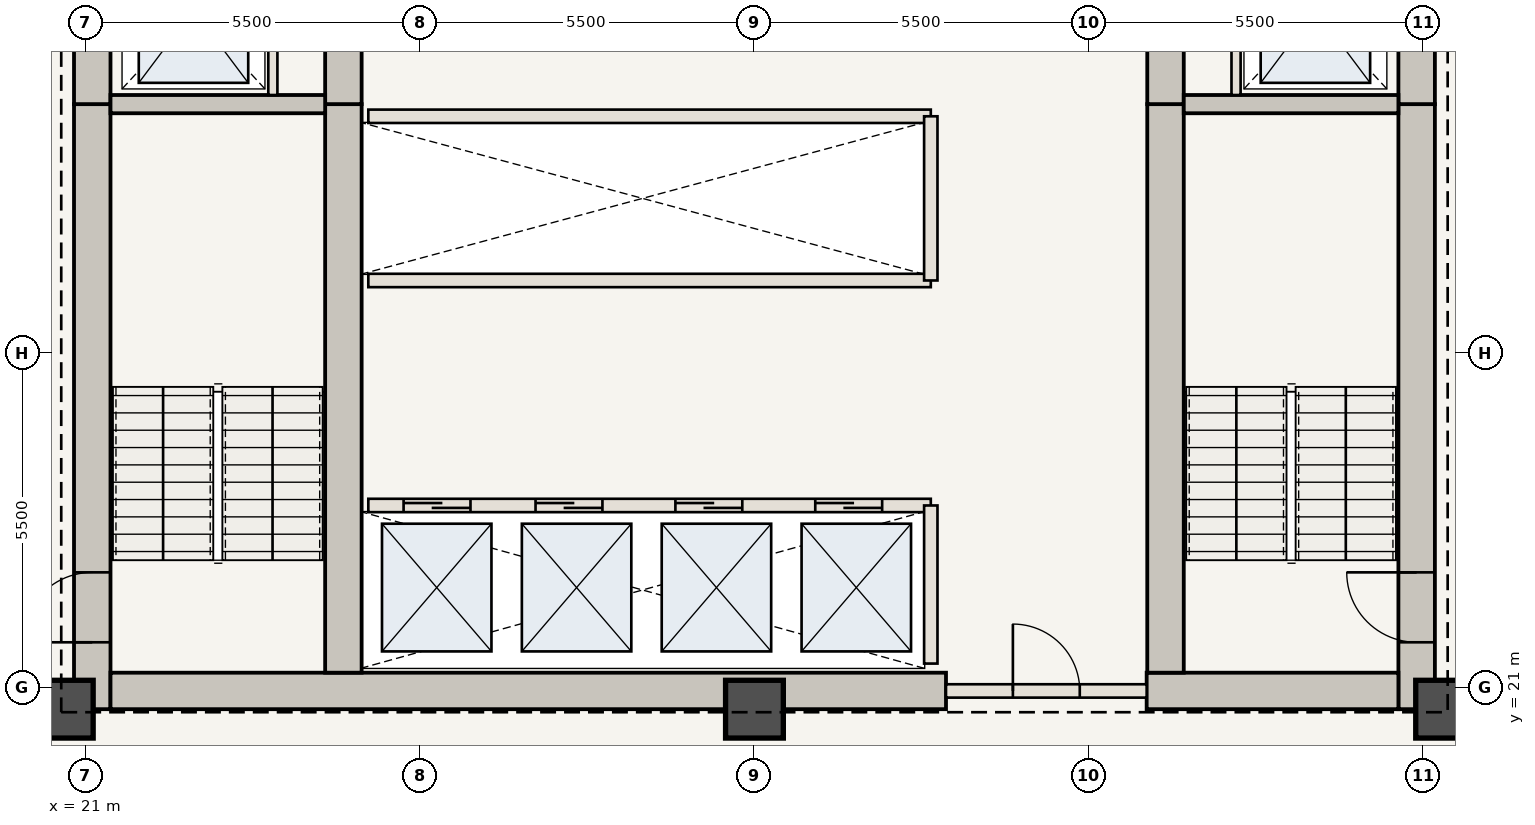
"""IFC4 building model, lengths in metres.
Left out: names, types, materials, properties, quantities, classifications, styles, units other than length and angle.
Written with IfcOpenShell. Run it as: python <this file> out.ifc"""

import sys

from ifc_helpers import new_model, si_unit, direction, frame, frame_2d, origin, origin_2d, place, context, subcontext, project, spatial, rectangle, extrude, element, fill, save


model = new_model("IFC4")
c1 = context("Model", 3, precision=1e-05, world=origin(), true_north=direction((0.0, 1.0)))
c2 = subcontext(c1, "Body", "Model", "MODEL_VIEW")
j1 = project(units=[si_unit("LENGTHUNIT", "METRE"), si_unit("PLANEANGLEUNIT", "RADIAN")], contexts=[c1])
p1 = place(None, origin())
s1 = spatial("IfcSite", under=j1, at=p1, CompositionType="ELEMENT")
p2 = place(p1, origin())
s2 = spatial("IfcBuilding", under=s1, at=p2, CompositionType="ELEMENT")
p3 = place(p2, frame((0.0, 0.0, 122.15)))
s3 = spatial("IfcBuildingStorey", under=s2, at=p3, CompositionType="ELEMENT", Elevation=122.15)
p4 = place(p3, frame((21.11, 20.65, 0.0), z_axis=(0.0, 0.0, 1.0), x_axis=(0.0, 1.0, 0.0)))
e1 = element("IfcWall", 1, at=p4, inside=s3, PredefinedType="SHEAR", context=c2, shape_type="SweptSolid", body=[
    extrude(rectangle(XDim=9.95, YDim=0.6, at=frame_2d((4.975, 0.0))), origin(), (0.0, 0.0, 1.0), 3.85),
])
p5 = place(p4, frame((1.1, 0.0, 0.0)))
e2 = element("IfcOpeningElement", 2, at=p5, cuts=e1, PredefinedType="OPENING", context=c2, shape_type="SweptSolid", body=[
    extrude(rectangle(XDim=1.15, YDim=2.15, at=frame_2d((0.575, 1.075))), frame((0.0, 0.31, 0.0), z_axis=(0.0, -1.0, 0.0), x_axis=(1.0, 0.0, 0.0)), (0.0, 0.0, 1.0), 0.62),
])
p6 = place(p3, frame((21.11, 30.6, 0.0), z_axis=(0.0, 0.0, 1.0), x_axis=(0.0, 1.0, 0.0)))
e3 = element("IfcWall", 3, at=p6, inside=s3, PredefinedType="SHEAR", context=c2, shape_type="SweptSolid", body=[
    extrude(rectangle(XDim=12.7, YDim=0.6, at=frame_2d((6.35, 0.0))), origin(), (0.0, 0.0, 1.0), 3.85),
])
p7 = place(p6, frame((4.2, 0.0, 0.0)))
e4 = element("IfcOpeningElement", 4, at=p7, cuts=e3, PredefinedType="OPENING", context=c2, shape_type="SweptSolid", body=[
    extrude(rectangle(XDim=1.1, YDim=2.15, at=frame_2d((0.55, 1.075))), frame((0.0, 0.31, 0.0), z_axis=(0.0, -1.0, 0.0), x_axis=(1.0, 0.0, 0.0)), (0.0, 0.0, 1.0), 0.62),
])
p8 = place(p6, frame((8.05, 0.0, 0.0)))
e5 = element("IfcOpeningElement", 5, at=p8, cuts=e3, PredefinedType="OPENING", context=c2, shape_type="SweptSolid", body=[
    extrude(rectangle(XDim=0.92, YDim=2.1, at=frame_2d((0.46, 1.05))), frame((0.0, 0.31, 0.0), z_axis=(0.0, -1.0, 0.0), x_axis=(1.0, 0.0, 0.0)), (0.0, 0.0, 1.0), 0.62),
])
p9 = place(p6, frame((9.45, 0.0, 0.0)))
e6 = element("IfcOpeningElement", 6, at=p9, cuts=e3, PredefinedType="OPENING", context=c2, shape_type="SweptSolid", body=[
    extrude(rectangle(XDim=0.88, YDim=2.1, at=frame_2d((0.44, 1.05))), frame((0.0, 0.31, 0.0), z_axis=(0.0, -1.0, 0.0), x_axis=(1.0, 0.0, 0.0)), (0.0, 0.0, 1.0), 0.62),
])
p10 = place(p6, frame((10.85, 0.0, 0.0)))
e7 = element("IfcOpeningElement", 7, at=p10, cuts=e3, PredefinedType="OPENING", context=c2, shape_type="SweptSolid", body=[
    extrude(rectangle(XDim=0.88, YDim=2.1, at=frame_2d((0.44, 1.05))), frame((0.0, 0.31, 0.0), z_axis=(0.0, -1.0, 0.0), x_axis=(1.0, 0.0, 0.0)), (0.0, 0.0, 1.0), 0.62),
])
p11 = place(p3, frame((42.89, 20.65, 0.0), z_axis=(0.0, 0.0, 1.0), x_axis=(0.0, 1.0, 0.0)))
e8 = element("IfcWall", 8, at=p11, inside=s3, PredefinedType="SHEAR", context=c2, shape_type="SweptSolid", body=[
    extrude(rectangle(XDim=9.95, YDim=0.6, at=frame_2d((4.975, 0.0))), origin(), (0.0, 0.0, 1.0), 3.85),
])
p12 = place(p11, frame((1.1, 0.0, 0.0)))
e9 = element("IfcOpeningElement", 9, at=p12, cuts=e8, PredefinedType="OPENING", context=c2, shape_type="SweptSolid", body=[
    extrude(rectangle(XDim=1.15, YDim=2.15, at=frame_2d((0.575, 1.075))), frame((0.0, 0.31, 0.0), z_axis=(0.0, -1.0, 0.0), x_axis=(1.0, 0.0, 0.0)), (0.0, 0.0, 1.0), 0.62),
])
p13 = place(p3, frame((42.89, 30.6, 0.0), z_axis=(0.0, 0.0, 1.0), x_axis=(0.0, 1.0, 0.0)))
e10 = element("IfcWall", 10, at=p13, inside=s3, PredefinedType="SHEAR", context=c2, shape_type="SweptSolid", body=[
    extrude(rectangle(XDim=12.7, YDim=0.6, at=frame_2d((6.35, 0.0))), origin(), (0.0, 0.0, 1.0), 3.85),
])
p14 = place(p13, frame((4.2, 0.0, 0.0)))
e11 = element("IfcOpeningElement", 11, at=p14, cuts=e10, PredefinedType="OPENING", context=c2, shape_type="SweptSolid", body=[
    extrude(rectangle(XDim=1.1, YDim=2.15, at=frame_2d((0.55, 1.075))), frame((0.0, 0.31, 0.0), z_axis=(0.0, -1.0, 0.0), x_axis=(1.0, 0.0, 0.0)), (0.0, 0.0, 1.0), 0.62),
])
p15 = place(p13, frame((9.2, 0.0, 0.0)))
e12 = element("IfcOpeningElement", 12, at=p15, cuts=e10, PredefinedType="OPENING", context=c2, shape_type="SweptSolid", body=[
    extrude(rectangle(XDim=0.92, YDim=2.1, at=frame_2d((0.46, 1.05))), frame((0.0, 0.31, 0.0), z_axis=(0.0, -1.0, 0.0), x_axis=(1.0, 0.0, 0.0)), (0.0, 0.0, 1.0), 0.62),
])
p16 = place(p3, frame((21.41, 20.95, 0.0), z_axis=(0.0, 0.0, 1.0), x_axis=(1.0, 0.0, 0.0)))
e13 = element("IfcWall", 13, at=p16, inside=s3, PredefinedType="SHEAR", context=c2, shape_type="SweptSolid", body=[
    extrude(rectangle(XDim=13.74, YDim=0.6, at=frame_2d((6.87, 0.0))), origin(), (0.0, 0.0, 1.0), 3.85),
])
p17 = place(p3, frame((38.45, 20.95, 0.0), z_axis=(0.0, 0.0, 1.0), x_axis=(1.0, 0.0, 0.0)))
e14 = element("IfcWall", 14, at=p17, inside=s3, PredefinedType="SHEAR", context=c2, shape_type="SweptSolid", body=[
    extrude(rectangle(XDim=4.14, YDim=0.6, at=frame_2d((2.07, 0.0))), origin(), (0.0, 0.0, 1.0), 3.85),
])
p18 = place(p3, frame((25.24, 21.25, 0.0), z_axis=(0.0, 0.0, 1.0), x_axis=(0.0, 1.0, 0.0)))
e15 = element("IfcWall", 15, at=p18, inside=s3, PredefinedType="SHEAR", context=c2, shape_type="SweptSolid", body=[
    extrude(rectangle(XDim=9.35, YDim=0.6, at=frame_2d((4.675, 0.0))), origin(), (0.0, 0.0, 1.0), 3.85),
])
p19 = place(p3, frame((25.24, 30.6, 0.0), z_axis=(0.0, 0.0, 1.0), x_axis=(0.0, 1.0, 0.0)))
e16 = element("IfcWall", 16, at=p19, inside=s3, PredefinedType="SHEAR", context=c2, shape_type="SweptSolid", body=[
    extrude(rectangle(XDim=12.1, YDim=0.6, at=frame_2d((6.05, 0.0))), origin(), (0.0, 0.0, 1.0), 3.85),
])
p20 = place(p19, frame((6.25, 0.0, 0.0)))
e17 = element("IfcOpeningElement", 17, at=p20, cuts=e16, PredefinedType="OPENING", context=c2, shape_type="SweptSolid", body=[
    extrude(rectangle(XDim=1.1, YDim=2.15, at=frame_2d((0.55, 1.075))), frame((0.0, 0.31, 0.0), z_axis=(0.0, -1.0, 0.0), x_axis=(1.0, 0.0, 0.0)), (0.0, 0.0, 1.0), 0.62),
])
p21 = place(p3, frame((38.76, 21.25, 0.0), z_axis=(0.0, 0.0, 1.0), x_axis=(0.0, 1.0, 0.0)))
e18 = element("IfcWall", 18, at=p21, inside=s3, PredefinedType="SHEAR", context=c2, shape_type="SweptSolid", body=[
    extrude(rectangle(XDim=9.35, YDim=0.6, at=frame_2d((4.675, 0.0))), origin(), (0.0, 0.0, 1.0), 3.85),
])
p22 = place(p3, frame((38.76, 30.6, 0.0), z_axis=(0.0, 0.0, 1.0), x_axis=(0.0, 1.0, 0.0)))
e19 = element("IfcWall", 19, at=p22, inside=s3, PredefinedType="SHEAR", context=c2, shape_type="SweptSolid", body=[
    extrude(rectangle(XDim=12.1, YDim=0.6, at=frame_2d((6.05, 0.0))), origin(), (0.0, 0.0, 1.0), 3.85),
])
for number, where, z_axis, x_axis in (
    (20, (20.65, 20.65, 0.0), (0.0, 0.0, 1.0), (1.0, 0.0, 0.0)),
    (21, (32.0, 20.65, 0.0), (0.0, 0.0, 1.0), (1.0, 0.0, 0.0)),
    (22, (43.35, 20.65, 0.0), (0.0, 0.0, 1.0), (1.0, 0.0, 0.0)),
):
    element("IfcColumn", number, at=place(p3, frame(where, z_axis=z_axis, x_axis=x_axis)), inside=s3, PredefinedType="COLUMN", context=c2, shape_type="SweptSolid", body=[
        extrude(rectangle(XDim=0.95, YDim=0.95, at=origin_2d()), origin(), (0.0, 0.0, 1.0), 3.85),
    ])
for number, where, z_axis, x_axis in (
    (23, (21.41, 30.6, 0.0), (0.0, 0.0, 1.0), (1.0, 0.0, 0.0)),
    (24, (39.06, 30.6, 0.0), (0.0, 0.0, 1.0), (1.0, 0.0, 0.0)),
):
    element("IfcWall", number, at=place(p3, frame(where, z_axis=z_axis, x_axis=x_axis)), inside=s3, PredefinedType="SHEAR", context=c2, shape_type="SweptSolid", body=[
        extrude(rectangle(XDim=3.53, YDim=0.3, at=frame_2d((1.765, 0.0))), origin(), (0.0, 0.0, 1.0), 3.685),
    ])
for number, where, z_axis, x_axis in (
    (25, (24.08, 30.75, 0.0), (0.0, 0.0, 1.0), (0.0, 1.0, 0.0)),
    (26, (39.92, 30.75, 0.0), (0.0, 0.0, 1.0), (0.0, 1.0, 0.0)),
):
    element("IfcWall", number, at=place(p3, frame(where, z_axis=z_axis, x_axis=x_axis)), inside=s3, PredefinedType="STANDARD", context=c2, shape_type="SweptSolid", body=[
        extrude(rectangle(XDim=2.65, YDim=0.15, at=frame_2d((1.325, 0.0))), origin(), (0.0, 0.0, 1.0), 3.685),
    ])
p23 = place(p3, frame((35.15, 20.95, 0.0), z_axis=(0.0, 0.0, 1.0), x_axis=(1.0, 0.0, 0.0)))
e27 = element("IfcWall", 27, at=p23, inside=s3, PredefinedType="STANDARD", context=c2, shape_type="SweptSolid", body=[
    extrude(rectangle(XDim=3.3, YDim=0.22, at=frame_2d((1.65, 0.0))), origin(), (0.0, 0.0, 1.0), 3.685),
])
p24 = place(p23, frame((1.1, 0.0, 0.0)))
e28 = element("IfcOpeningElement", 28, at=p24, cuts=e27, PredefinedType="OPENING", context=c2, shape_type="SweptSolid", body=[
    extrude(rectangle(XDim=1.1, YDim=2.15, at=frame_2d((0.55, 1.075))), frame((0.0, 0.12, 0.0), z_axis=(0.0, -1.0, 0.0), x_axis=(1.0, 0.0, 0.0)), (0.0, 0.0, 1.0), 0.24),
])
p25 = place(p3, frame((25.65, 24.0, 0.0), z_axis=(0.0, 0.0, 1.0), x_axis=(1.0, 0.0, 0.0)))
e29 = element("IfcWall", 29, at=p25, inside=s3, PredefinedType="STANDARD", context=c2, shape_type="SweptSolid", body=[
    extrude(rectangle(XDim=9.25, YDim=0.22, at=frame_2d((4.625, 0.0))), origin(), (0.0, 0.0, 1.0), 3.685),
])
p26 = place(p25, frame((0.58, 0.0, 0.0)))
e30 = element("IfcOpeningElement", 30, at=p26, cuts=e29, PredefinedType="OPENING", context=c2, shape_type="SweptSolid", body=[
    extrude(rectangle(XDim=1.1, YDim=2.15, at=frame_2d((0.55, 1.075))), frame((0.0, 0.12, 0.0), z_axis=(0.0, -1.0, 0.0), x_axis=(1.0, 0.0, 0.0)), (0.0, 0.0, 1.0), 0.24),
])
p27 = place(p25, frame((2.75, 0.0, 0.0)))
e31 = element("IfcOpeningElement", 31, at=p27, cuts=e29, PredefinedType="OPENING", context=c2, shape_type="SweptSolid", body=[
    extrude(rectangle(XDim=1.1, YDim=2.15, at=frame_2d((0.55, 1.075))), frame((0.0, 0.12, 0.0), z_axis=(0.0, -1.0, 0.0), x_axis=(1.0, 0.0, 0.0)), (0.0, 0.0, 1.0), 0.24),
])
p28 = place(p25, frame((5.05, 0.0, 0.0)))
e32 = element("IfcOpeningElement", 32, at=p28, cuts=e29, PredefinedType="OPENING", context=c2, shape_type="SweptSolid", body=[
    extrude(rectangle(XDim=1.1, YDim=2.15, at=frame_2d((0.55, 1.075))), frame((0.0, 0.12, 0.0), z_axis=(0.0, -1.0, 0.0), x_axis=(1.0, 0.0, 0.0)), (0.0, 0.0, 1.0), 0.24),
])
p29 = place(p25, frame((7.35, 0.0, 0.0)))
e33 = element("IfcOpeningElement", 33, at=p29, cuts=e29, PredefinedType="OPENING", context=c2, shape_type="SweptSolid", body=[
    extrude(rectangle(XDim=1.1, YDim=2.15, at=frame_2d((0.55, 1.075))), frame((0.0, 0.12, 0.0), z_axis=(0.0, -1.0, 0.0), x_axis=(1.0, 0.0, 0.0)), (0.0, 0.0, 1.0), 0.24),
])
p30 = place(p3, frame((34.9, 21.4, 0.0), z_axis=(0.0, 0.0, 1.0), x_axis=(0.0, 1.0, 0.0)))
e34 = element("IfcWall", 34, at=p30, inside=s3, PredefinedType="STANDARD", context=c2, shape_type="SweptSolid", body=[
    extrude(rectangle(XDim=2.6, YDim=0.22, at=frame_2d((1.3, 0.0))), origin(), (0.0, 0.0, 1.0), 3.685),
])
for number, where, z_axis, x_axis in (
    (35, (25.65, 27.7, 0.0), (0.0, 0.0, 1.0), (1.0, 0.0, 0.0)),
    (36, (25.65, 30.4, 0.0), (0.0, 0.0, 1.0), (1.0, 0.0, 0.0)),
):
    element("IfcWall", number, at=place(p3, frame(where, z_axis=z_axis, x_axis=x_axis)), inside=s3, PredefinedType="STANDARD", context=c2, shape_type="SweptSolid", body=[
        extrude(rectangle(XDim=9.25, YDim=0.22, at=frame_2d((4.625, 0.0))), origin(), (0.0, 0.0, 1.0), 3.685),
    ])
p31 = place(p3, frame((34.9, 27.7, 0.0), z_axis=(0.0, 0.0, 1.0), x_axis=(0.0, 1.0, 0.0)))
e37 = element("IfcWall", 37, at=p31, inside=s3, PredefinedType="STANDARD", context=c2, shape_type="SweptSolid", body=[
    extrude(rectangle(XDim=2.7, YDim=0.22, at=frame_2d((1.35, 0.0))), origin(), (0.0, 0.0, 1.0), 3.685),
])
p32 = place(p5, origin())
e38 = element("IfcDoor", 38, at=p32, inside=s3, OperationType="SINGLE_SWING_LEFT", PredefinedType="DOOR", context=c2, shape_type="SweptSolid", body=[
    extrude(rectangle(XDim=1.15, YDim=2.15, at=frame_2d((0.575, 1.075))), frame((0.0, 0.025, 0.0), z_axis=(0.0, -1.0, 0.0), x_axis=(1.0, 0.0, 0.0)), (0.0, 0.0, 1.0), 0.05),
])
fill(e2, e38)
p33 = place(p12, origin())
e39 = element("IfcDoor", 39, at=p33, inside=s3, OperationType="SINGLE_SWING_RIGHT", PredefinedType="DOOR", context=c2, shape_type="SweptSolid", body=[
    extrude(rectangle(XDim=1.15, YDim=2.15, at=frame_2d((0.575, 1.075))), frame((0.0, 0.025, 0.0), z_axis=(0.0, -1.0, 0.0), x_axis=(1.0, 0.0, 0.0)), (0.0, 0.0, 1.0), 0.05),
])
fill(e9, e39)
p34 = place(p24, origin())
e40 = element("IfcDoor", 40, at=p34, inside=s3, OperationType="SINGLE_SWING_LEFT", PredefinedType="DOOR", context=c2, shape_type="SweptSolid", body=[
    extrude(rectangle(XDim=1.1, YDim=2.15, at=frame_2d((0.55, 1.075))), frame((0.0, 0.025, 0.0), z_axis=(0.0, -1.0, 0.0), x_axis=(1.0, 0.0, 0.0)), (0.0, 0.0, 1.0), 0.05),
])
fill(e28, e40)
p35 = place(p26, origin())
e41 = element("IfcDoor", 41, at=p35, inside=s3, OperationType="DOUBLE_DOOR_SLIDING", PredefinedType="DOOR", context=c2, shape_type="SweptSolid", body=[
    extrude(rectangle(XDim=1.1, YDim=2.15, at=frame_2d((0.55, 1.075))), frame((0.0, 0.025, 0.0), z_axis=(0.0, -1.0, 0.0), x_axis=(1.0, 0.0, 0.0)), (0.0, 0.0, 1.0), 0.05),
])
fill(e30, e41)
p36 = place(p27, origin())
e42 = element("IfcDoor", 42, at=p36, inside=s3, OperationType="DOUBLE_DOOR_SLIDING", PredefinedType="DOOR", context=c2, shape_type="SweptSolid", body=[
    extrude(rectangle(XDim=1.1, YDim=2.15, at=frame_2d((0.55, 1.075))), frame((0.0, 0.025, 0.0), z_axis=(0.0, -1.0, 0.0), x_axis=(1.0, 0.0, 0.0)), (0.0, 0.0, 1.0), 0.05),
])
fill(e31, e42)
p37 = place(p28, origin())
e43 = element("IfcDoor", 43, at=p37, inside=s3, OperationType="DOUBLE_DOOR_SLIDING", PredefinedType="DOOR", context=c2, shape_type="SweptSolid", body=[
    extrude(rectangle(XDim=1.1, YDim=2.15, at=frame_2d((0.55, 1.075))), frame((0.0, 0.025, 0.0), z_axis=(0.0, -1.0, 0.0), x_axis=(1.0, 0.0, 0.0)), (0.0, 0.0, 1.0), 0.05),
])
fill(e32, e43)
p38 = place(p29, origin())
e44 = element("IfcDoor", 44, at=p38, inside=s3, OperationType="DOUBLE_DOOR_SLIDING", PredefinedType="DOOR", context=c2, shape_type="SweptSolid", body=[
    extrude(rectangle(XDim=1.1, YDim=2.15, at=frame_2d((0.55, 1.075))), frame((0.0, 0.025, 0.0), z_axis=(0.0, -1.0, 0.0), x_axis=(1.0, 0.0, 0.0)), (0.0, 0.0, 1.0), 0.05),
])
fill(e33, e44)
save(model, sys.argv[1])
